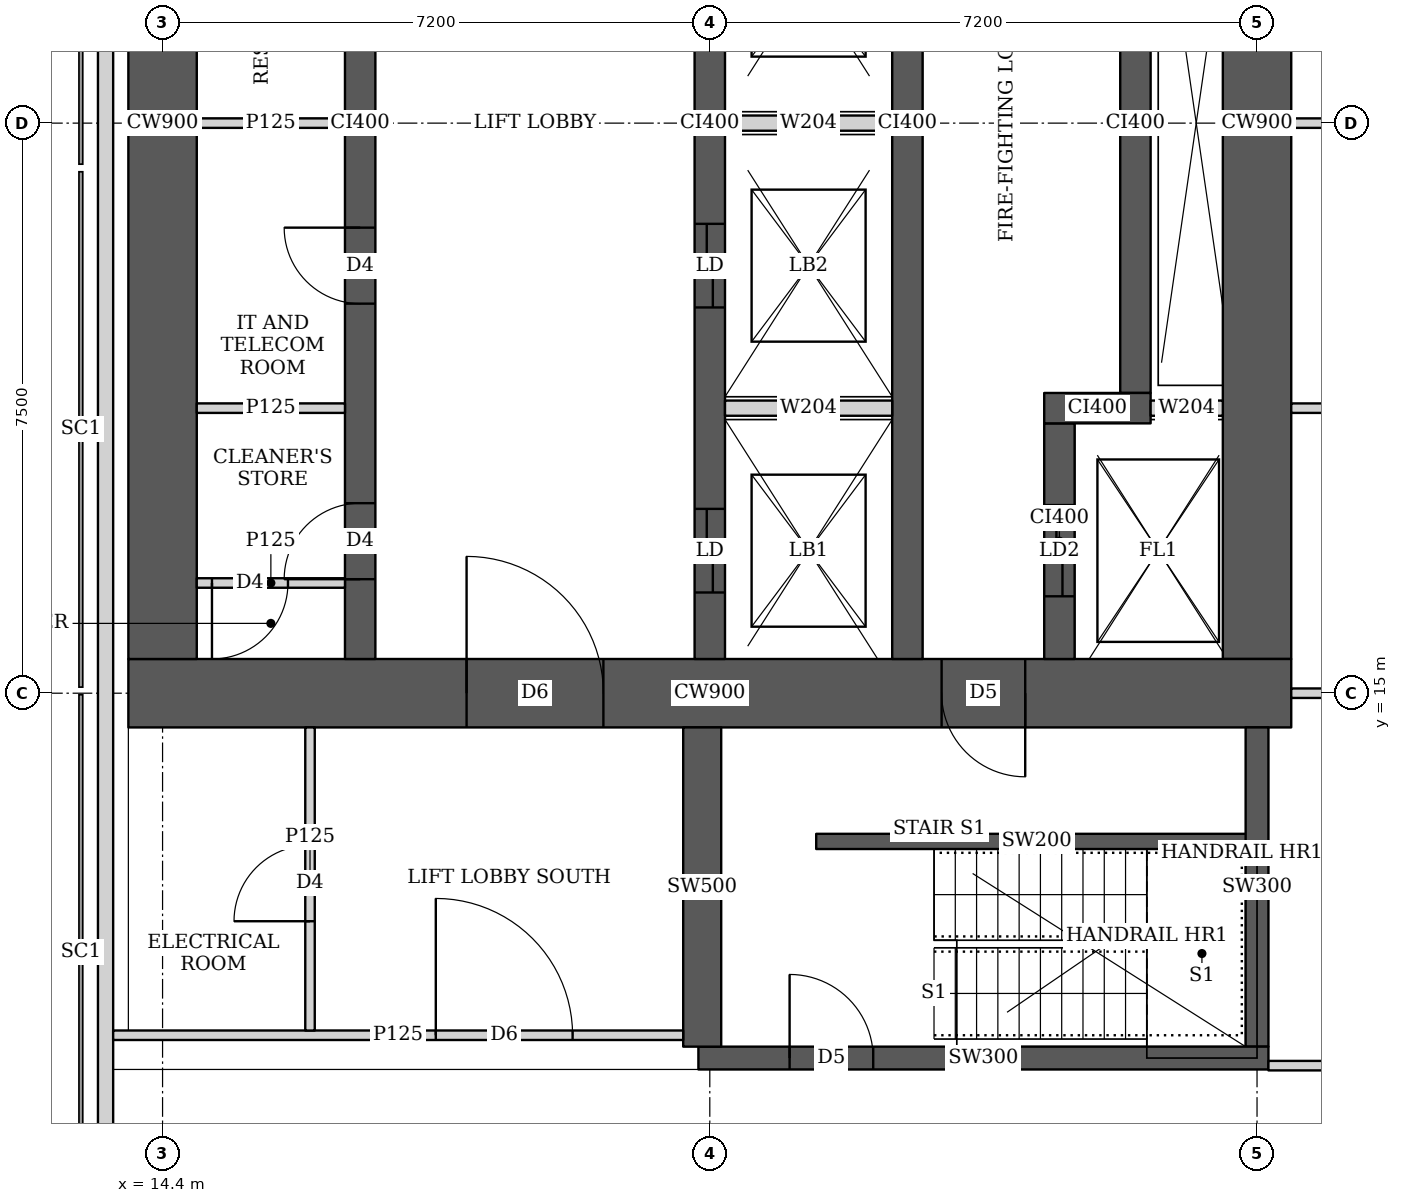
"""IFC4 building model, lengths in metres.
Left out: names, types, materials, properties, quantities, classifications, styles, units other than length and angle.
Written with IfcOpenShell. Run it as: python <this file> out.ifc"""

import sys

from ifc_helpers import new_model, si_unit, direction, frame, frame_2d, origin, place, context, subcontext, project, spatial, rectangle, extrude, element, fill, save


model = new_model("IFC4")
c1 = context("Model", 3, precision=1e-05, world=origin(), true_north=direction((0.0, 1.0)))
c2 = subcontext(c1, "Body", "Model", "MODEL_VIEW")
j1 = project(units=[si_unit("LENGTHUNIT", "METRE"), si_unit("PLANEANGLEUNIT", "RADIAN")], contexts=[c1])
p1 = place(None, origin())
s1 = spatial("IfcSite", under=j1, at=p1, CompositionType="ELEMENT")
p2 = place(p1, origin())
s2 = spatial("IfcBuilding", under=s1, at=p2, CompositionType="ELEMENT")
p3 = place(p2, frame((0.0, 0.0, 255.35)))
s3 = spatial("IfcBuildingStorey", under=s2, at=p3, CompositionType="ELEMENT", Elevation=255.35)
p4 = place(p3, frame((13.95, 15.0, 0.0), z_axis=(0.0, 0.0, 1.0), x_axis=(1.0, 0.0, 0.0)))
e1 = element("IfcWall", 1, at=p4, inside=s3, PredefinedType="SHEAR", context=c2, shape_type="SweptSolid", body=[
    extrude(rectangle(XDim=15.3, YDim=0.9, at=frame_2d((7.65, 0.0))), origin(), (0.0, 0.0, 1.0), 3.75),
])
p5 = place(p4, frame((4.45, 0.0, 0.0)))
e2 = element("IfcOpeningElement", 2, at=p5, cuts=e1, PredefinedType="OPENING", context=c2, shape_type="SweptSolid", body=[
    extrude(rectangle(XDim=1.8, YDim=2.1, at=frame_2d((0.9, 1.05))), frame((0.0, 0.46, 0.0), z_axis=(0.0, -1.0, 0.0), x_axis=(1.0, 0.0, 0.0)), (0.0, 0.0, 1.0), 0.92),
])
p6 = place(p4, frame((10.7, 0.0, 0.0)))
e3 = element("IfcOpeningElement", 3, at=p6, cuts=e1, PredefinedType="OPENING", context=c2, shape_type="SweptSolid", body=[
    extrude(rectangle(XDim=1.1, YDim=2.1, at=frame_2d((0.55, 1.05))), frame((0.0, 0.46, 0.0), z_axis=(0.0, -1.0, 0.0), x_axis=(1.0, 0.0, 0.0)), (0.0, 0.0, 1.0), 0.92),
])
for number, where, z_axis, x_axis in (
    (4, (14.4, 15.45, 0.0), (0.0, 0.0, 1.0), (0.0, 1.0, 0.0)),
    (5, (28.8, 15.45, 0.0), (0.0, 0.0, 1.0), (0.0, 1.0, 0.0)),
):
    element("IfcWall", number, at=place(p3, frame(where, z_axis=z_axis, x_axis=x_axis)), inside=s3, PredefinedType="SHEAR", context=c2, shape_type="SweptSolid", body=[
        extrude(rectangle(XDim=14.1, YDim=0.9, at=frame_2d((7.05, 0.0))), origin(), (0.0, 0.0, 1.0), 3.75),
    ])
p7 = place(p3, frame((17.0, 15.45, 0.0), z_axis=(0.0, 0.0, 1.0), x_axis=(0.0, 1.0, 0.0)))
e6 = element("IfcWall", 6, at=p7, inside=s3, PredefinedType="SHEAR", context=c2, shape_type="SweptSolid", body=[
    extrude(rectangle(XDim=14.1, YDim=0.4, at=frame_2d((7.05, 0.0))), origin(), (0.0, 0.0, 1.0), 3.75),
])
p8 = place(p7, frame((1.05, 0.0, 0.0)))
e7 = element("IfcOpeningElement", 7, at=p8, cuts=e6, PredefinedType="OPENING", context=c2, shape_type="SweptSolid", body=[
    extrude(rectangle(XDim=1.0, YDim=2.1, at=frame_2d((0.5, 1.05))), frame((0.0, 0.21, 0.0), z_axis=(0.0, -1.0, 0.0), x_axis=(1.0, 0.0, 0.0)), (0.0, 0.0, 1.0), 0.42),
])
p9 = place(p7, frame((4.675, 0.0, 0.0)))
e8 = element("IfcOpeningElement", 8, at=p9, cuts=e6, PredefinedType="OPENING", context=c2, shape_type="SweptSolid", body=[
    extrude(rectangle(XDim=1.0, YDim=2.1, at=frame_2d((0.5, 1.05))), frame((0.0, 0.21, 0.0), z_axis=(0.0, -1.0, 0.0), x_axis=(1.0, 0.0, 0.0)), (0.0, 0.0, 1.0), 0.42),
])
p10 = place(p7, frame((8.425, 0.0, 0.0)))
e9 = element("IfcOpeningElement", 9, at=p10, cuts=e6, PredefinedType="OPENING", context=c2, shape_type="SweptSolid", body=[
    extrude(rectangle(XDim=1.0, YDim=2.1, at=frame_2d((0.5, 1.05))), frame((0.0, 0.21, 0.0), z_axis=(0.0, -1.0, 0.0), x_axis=(1.0, 0.0, 0.0)), (0.0, 0.0, 1.0), 0.42),
])
p11 = place(p7, frame((12.175, 0.0, 0.0)))
e10 = element("IfcOpeningElement", 10, at=p11, cuts=e6, PredefinedType="OPENING", context=c2, shape_type="SweptSolid", body=[
    extrude(rectangle(XDim=1.0, YDim=2.1, at=frame_2d((0.5, 1.05))), frame((0.0, 0.21, 0.0), z_axis=(0.0, -1.0, 0.0), x_axis=(1.0, 0.0, 0.0)), (0.0, 0.0, 1.0), 0.42),
])
p12 = place(p3, frame((21.6, 15.45, 0.0), z_axis=(0.0, 0.0, 1.0), x_axis=(0.0, 1.0, 0.0)))
e11 = element("IfcWall", 11, at=p12, inside=s3, PredefinedType="SHEAR", context=c2, shape_type="SweptSolid", body=[
    extrude(rectangle(XDim=14.1, YDim=0.4, at=frame_2d((7.05, 0.0))), origin(), (0.0, 0.0, 1.0), 3.75),
])
p13 = place(p12, frame((0.875, 0.0, 0.0)))
e12 = element("IfcOpeningElement", 12, at=p13, cuts=e11, PredefinedType="OPENING", context=c2, shape_type="SweptSolid", body=[
    extrude(rectangle(XDim=1.1, YDim=2.1, at=frame_2d((0.55, 1.05))), frame((0.0, 0.21, 0.0), z_axis=(0.0, -1.0, 0.0), x_axis=(1.0, 0.0, 0.0)), (0.0, 0.0, 1.0), 0.42),
])
p14 = place(p12, frame((4.625, 0.0, 0.0)))
e13 = element("IfcOpeningElement", 13, at=p14, cuts=e11, PredefinedType="OPENING", context=c2, shape_type="SweptSolid", body=[
    extrude(rectangle(XDim=1.1, YDim=2.1, at=frame_2d((0.55, 1.05))), frame((0.0, 0.21, 0.0), z_axis=(0.0, -1.0, 0.0), x_axis=(1.0, 0.0, 0.0)), (0.0, 0.0, 1.0), 0.42),
])
p15 = place(p12, frame((8.375, 0.0, 0.0)))
e14 = element("IfcOpeningElement", 14, at=p15, cuts=e11, PredefinedType="OPENING", context=c2, shape_type="SweptSolid", body=[
    extrude(rectangle(XDim=1.1, YDim=2.1, at=frame_2d((0.55, 1.05))), frame((0.0, 0.21, 0.0), z_axis=(0.0, -1.0, 0.0), x_axis=(1.0, 0.0, 0.0)), (0.0, 0.0, 1.0), 0.42),
])
p16 = place(p12, frame((12.125, 0.0, 0.0)))
e15 = element("IfcOpeningElement", 15, at=p16, cuts=e11, PredefinedType="OPENING", context=c2, shape_type="SweptSolid", body=[
    extrude(rectangle(XDim=1.1, YDim=2.1, at=frame_2d((0.55, 1.05))), frame((0.0, 0.21, 0.0), z_axis=(0.0, -1.0, 0.0), x_axis=(1.0, 0.0, 0.0)), (0.0, 0.0, 1.0), 0.42),
])
p17 = place(p3, frame((24.2, 15.45, 0.0), z_axis=(0.0, 0.0, 1.0), x_axis=(0.0, 1.0, 0.0)))
e16 = element("IfcWall", 16, at=p17, inside=s3, PredefinedType="SHEAR", context=c2, shape_type="SweptSolid", body=[
    extrude(rectangle(XDim=14.1, YDim=0.4, at=frame_2d((7.05, 0.0))), origin(), (0.0, 0.0, 1.0), 3.75),
])
p18 = place(p3, frame((26.2, 15.45, 0.0), z_axis=(0.0, 0.0, 1.0), x_axis=(0.0, 1.0, 0.0)))
e17 = element("IfcWall", 17, at=p18, inside=s3, PredefinedType="SHEAR", context=c2, shape_type="SweptSolid", body=[
    extrude(rectangle(XDim=3.1, YDim=0.4, at=frame_2d((1.55, 0.0))), origin(), (0.0, 0.0, 1.0), 3.75),
])
p19 = place(p18, frame((0.825, 0.0, 0.0)))
e18 = element("IfcOpeningElement", 18, at=p19, cuts=e17, PredefinedType="OPENING", context=c2, shape_type="SweptSolid", body=[
    extrude(rectangle(XDim=1.2, YDim=2.1, at=frame_2d((0.6, 1.05))), frame((0.0, 0.21, 0.0), z_axis=(0.0, -1.0, 0.0), x_axis=(1.0, 0.0, 0.0)), (0.0, 0.0, 1.0), 0.42),
])
p20 = place(p3, frame((26.0, 18.75, 0.0), z_axis=(0.0, 0.0, 1.0), x_axis=(1.0, 0.0, 0.0)))
e19 = element("IfcWall", 19, at=p20, inside=s3, PredefinedType="SHEAR", context=c2, shape_type="SweptSolid", body=[
    extrude(rectangle(XDim=1.4, YDim=0.4, at=frame_2d((0.7, 0.0))), origin(), (0.0, 0.0, 1.0), 3.75),
])
p21 = place(p3, frame((27.2, 18.95, 0.0), z_axis=(0.0, 0.0, 1.0), x_axis=(0.0, 1.0, 0.0)))
e20 = element("IfcWall", 20, at=p21, inside=s3, PredefinedType="SHEAR", context=c2, shape_type="SweptSolid", body=[
    extrude(rectangle(XDim=7.1, YDim=0.4, at=frame_2d((3.55, 0.0))), origin(), (0.0, 0.0, 1.0), 3.75),
])
p22 = place(p3, frame((21.45, 10.2, 0.0), z_axis=(0.0, 0.0, 1.0), x_axis=(1.0, 0.0, 0.0)))
e21 = element("IfcWall", 21, at=p22, inside=s3, PredefinedType="SHEAR", context=c2, shape_type="SweptSolid", body=[
    extrude(rectangle(XDim=7.5, YDim=0.3, at=frame_2d((3.75, 0.0))), origin(), (0.0, 0.0, 1.0), 3.75),
])
p23 = place(p22, frame((1.2, 0.0, 0.0)))
e22 = element("IfcOpeningElement", 22, at=p23, cuts=e21, PredefinedType="OPENING", context=c2, shape_type="SweptSolid", body=[
    extrude(rectangle(XDim=1.1, YDim=2.1, at=frame_2d((0.55, 1.05))), frame((0.0, 0.16, 0.0), z_axis=(0.0, -1.0, 0.0), x_axis=(1.0, 0.0, 0.0)), (0.0, 0.0, 1.0), 0.32),
])
p24 = place(p3, frame((21.5, 10.35, 0.0), z_axis=(0.0, 0.0, 1.0), x_axis=(0.0, 1.0, 0.0)))
e23 = element("IfcWall", 23, at=p24, inside=s3, PredefinedType="SHEAR", context=c2, shape_type="SweptSolid", body=[
    extrude(rectangle(XDim=4.2, YDim=0.5, at=frame_2d((2.1, 0.0))), origin(), (0.0, 0.0, 1.0), 3.75),
])
p25 = place(p3, frame((28.8, 10.35, 0.0), z_axis=(0.0, 0.0, 1.0), x_axis=(0.0, 1.0, 0.0)))
e24 = element("IfcWall", 24, at=p25, inside=s3, PredefinedType="SHEAR", context=c2, shape_type="SweptSolid", body=[
    extrude(rectangle(XDim=4.2, YDim=0.3, at=frame_2d((2.1, 0.0))), origin(), (0.0, 0.0, 1.0), 3.75),
])
p26 = place(p3, frame((13.65, 43.037, 0.0), z_axis=(0.0, 0.0, 1.0), x_axis=(0.0, -1.0, 0.0)))
e25 = element("IfcWall", 25, at=p26, inside=s3, PredefinedType="SOLIDWALL", context=c2, shape_type="SweptSolid", body=[
    extrude(rectangle(XDim=35.374, YDim=0.2, at=frame_2d((17.687, 0.0))), origin(), (0.0, 0.0, 1.0), 3.5),
])
p27 = place(p26, frame((1.959, 0.0, 0.9)))
e26 = element("IfcOpeningElement", 26, at=p27, cuts=e25, PredefinedType="OPENING", context=c2, shape_type="SweptSolid", body=[
    extrude(rectangle(XDim=1.8, YDim=1.5, at=frame_2d((0.9, 0.75))), frame((0.0, 0.11, 0.0), z_axis=(0.0, -1.0, 0.0), x_axis=(1.0, 0.0, 0.0)), (0.0, 0.0, 1.0), 0.22),
])
p28 = place(p3, frame((13.75, 10.5, 0.0), z_axis=(0.0, 0.0, 1.0), x_axis=(1.0, 0.0, 0.0)))
e27 = element("IfcWall", 27, at=p28, inside=s3, PredefinedType="PARTITIONING", context=c2, shape_type="SweptSolid", body=[
    extrude(rectangle(XDim=7.5, YDim=0.125, at=frame_2d((3.75, 0.0))), origin(), (0.0, 0.0, 1.0), 3.5),
])
p29 = place(p28, frame((4.245, 0.0, 0.0)))
e28 = element("IfcOpeningElement", 28, at=p29, cuts=e27, PredefinedType="OPENING", context=c2, shape_type="SweptSolid", body=[
    extrude(rectangle(XDim=1.8, YDim=2.1, at=frame_2d((0.9, 1.05))), frame((0.0, 0.073, 0.0), z_axis=(0.0, -1.0, 0.0), x_axis=(1.0, 0.0, 0.0)), (0.0, 0.0, 1.0), 0.145),
])
p30 = place(p3, frame((16.34, 10.562, 0.0), z_axis=(0.0, 0.0, 1.0), x_axis=(0.0, 1.0, 0.0)))
e29 = element("IfcWall", 29, at=p30, inside=s3, PredefinedType="PARTITIONING", context=c2, shape_type="SweptSolid", body=[
    extrude(rectangle(XDim=3.988, YDim=0.125, at=frame_2d((1.994, 0.0))), origin(), (0.0, 0.0, 1.0), 3.5),
])
p31 = place(p30, frame((1.438, 0.0, 0.0)))
e30 = element("IfcOpeningElement", 30, at=p31, cuts=e29, PredefinedType="OPENING", context=c2, shape_type="SweptSolid", body=[
    extrude(rectangle(XDim=1.0, YDim=2.1, at=frame_2d((0.5, 1.05))), frame((0.0, 0.073, 0.0), z_axis=(0.0, -1.0, 0.0), x_axis=(1.0, 0.0, 0.0)), (0.0, 0.0, 1.0), 0.145),
])
p32 = place(p3, frame((28.95, 10.1, 0.0), z_axis=(0.0, 0.0, 1.0), x_axis=(1.0, 0.0, 0.0)))
e31 = element("IfcWall", 31, at=p32, inside=s3, PredefinedType="PARTITIONING", context=c2, shape_type="SweptSolid", body=[
    extrude(rectangle(XDim=8.933, YDim=0.125, at=frame_2d((4.467, 0.0))), origin(), (0.0, 0.0, 1.0), 3.5),
])
p33 = place(p3, frame((29.25, 15.0, 0.0), z_axis=(0.0, 0.0, 1.0), x_axis=(1.0, 0.0, 0.0)))
e32 = element("IfcWall", 32, at=p33, inside=s3, PredefinedType="PARTITIONING", context=c2, shape_type="SweptSolid", body=[
    extrude(rectangle(XDim=6.049, YDim=0.125, at=frame_2d((3.024, 0.0))), origin(), (0.0, 0.0, 1.0), 3.5),
])
p34 = place(p3, frame((29.25, 18.75, 0.0), z_axis=(0.0, 0.0, 1.0), x_axis=(1.0, 0.0, 0.0)))
e33 = element("IfcWall", 33, at=p34, inside=s3, PredefinedType="PARTITIONING", context=c2, shape_type="SweptSolid", body=[
    extrude(rectangle(XDim=7.0, YDim=0.125, at=frame_2d((3.5, 0.0))), origin(), (0.0, 0.0, 1.0), 3.5),
])
p35 = place(p3, frame((29.25, 22.5, 0.0), z_axis=(0.0, 0.0, 1.0), x_axis=(1.0, 0.0, 0.0)))
e34 = element("IfcWall", 34, at=p35, inside=s3, PredefinedType="PARTITIONING", context=c2, shape_type="SweptSolid", body=[
    extrude(rectangle(XDim=3.049, YDim=0.125, at=frame_2d((1.524, 0.0))), origin(), (0.0, 0.0, 1.0), 3.5),
])
p36 = place(p3, frame((14.85, 16.45, 0.0), z_axis=(0.0, 0.0, 1.0), x_axis=(1.0, 0.0, 0.0)))
e35 = element("IfcWall", 35, at=p36, inside=s3, PredefinedType="PARTITIONING", context=c2, shape_type="SweptSolid", body=[
    extrude(rectangle(XDim=1.95, YDim=0.125, at=frame_2d((0.975, 0.0))), origin(), (0.0, 0.0, 1.0), 3.5),
])
p37 = place(p36, frame((0.2, 0.0, 0.0)))
e36 = element("IfcOpeningElement", 36, at=p37, cuts=e35, PredefinedType="OPENING", context=c2, shape_type="SweptSolid", body=[
    extrude(rectangle(XDim=1.0, YDim=2.1, at=frame_2d((0.5, 1.05))), frame((0.0, 0.073, 0.0), z_axis=(0.0, -1.0, 0.0), x_axis=(1.0, 0.0, 0.0)), (0.0, 0.0, 1.0), 0.145),
])
for number, where, z_axis, x_axis in (
    (37, (14.85, 18.75, 0.0), (0.0, 0.0, 1.0), (1.0, 0.0, 0.0)),
    (38, (14.85, 22.5, 0.0), (0.0, 0.0, 1.0), (1.0, 0.0, 0.0)),
):
    element("IfcWall", number, at=place(p3, frame(where, z_axis=z_axis, x_axis=x_axis)), inside=s3, PredefinedType="PARTITIONING", context=c2, shape_type="SweptSolid", body=[
        extrude(rectangle(XDim=1.95, YDim=0.125, at=frame_2d((0.975, 0.0))), origin(), (0.0, 0.0, 1.0), 3.5),
    ])
p38 = place(p3, frame((23.0, 13.05, 0.0), z_axis=(0.0, 0.0, 1.0), x_axis=(1.0, 0.0, 0.0)))
e39 = element("IfcWall", 39, at=p38, inside=s3, PredefinedType="SHEAR", context=c2, shape_type="SweptSolid", body=[
    extrude(rectangle(XDim=5.8, YDim=0.2, at=frame_2d((2.9, 0.0))), origin(), (0.0, 0.0, 1.0), 3.75),
])
for number, where, z_axis, x_axis in (
    (40, (21.8, 18.75, 0.0), (0.0, 0.0, 1.0), (1.0, 0.0, 0.0)),
    (41, (21.8, 22.5, 0.0), (0.0, 0.0, 1.0), (1.0, 0.0, 0.0)),
):
    element("IfcWall", number, at=place(p3, frame(where, z_axis=z_axis, x_axis=x_axis)), inside=s3, PredefinedType="SOLIDWALL", context=c2, shape_type="SweptSolid", body=[
        extrude(rectangle(XDim=2.2, YDim=0.2, at=frame_2d((1.1, 0.0))), origin(), (0.0, 0.0, 1.0), 3.5),
    ])
p39 = place(p3, frame((27.4, 18.75, 0.0), z_axis=(0.0, 0.0, 1.0), x_axis=(1.0, 0.0, 0.0)))
e42 = element("IfcWall", 42, at=p39, inside=s3, PredefinedType="SOLIDWALL", context=c2, shape_type="SweptSolid", body=[
    extrude(rectangle(XDim=0.95, YDim=0.2, at=frame_2d((0.475, 0.0))), origin(), (0.0, 0.0, 1.0), 3.5),
])
p40 = place(p31, origin())
e43 = element("IfcDoor", 43, at=p40, inside=s3, OperationType="SINGLE_SWING_LEFT", PredefinedType="DOOR", context=c2, shape_type="SweptSolid", body=[
    extrude(rectangle(XDim=1.0, YDim=2.1, at=frame_2d((0.5, 1.05))), frame((0.0, 0.025, 0.0), z_axis=(0.0, -1.0, 0.0), x_axis=(1.0, 0.0, 0.0)), (0.0, 0.0, 1.0), 0.05),
])
fill(e30, e43)
p41 = place(p29, origin())
e44 = element("IfcDoor", 44, at=p41, inside=s3, OperationType="DOUBLE_DOOR_SINGLE_SWING", PredefinedType="DOOR", context=c2, shape_type="SweptSolid", body=[
    extrude(rectangle(XDim=1.8, YDim=2.1, at=frame_2d((0.9, 1.05))), frame((0.0, 0.025, 0.0), z_axis=(0.0, -1.0, 0.0), x_axis=(1.0, 0.0, 0.0)), (0.0, 0.0, 1.0), 0.05),
])
fill(e28, e44)
p42 = place(p37, origin())
e45 = element("IfcDoor", 45, at=p42, inside=s3, OperationType="SINGLE_SWING_RIGHT", PredefinedType="DOOR", context=c2, shape_type="SweptSolid", body=[
    extrude(rectangle(XDim=1.0, YDim=2.1, at=frame_2d((0.5, 1.05))), frame((0.0, 0.025, 0.0), z_axis=(0.0, -1.0, 0.0), x_axis=(1.0, 0.0, 0.0)), (0.0, 0.0, 1.0), 0.05),
])
fill(e36, e45)
p43 = place(p8, origin())
e46 = element("IfcDoor", 46, at=p43, inside=s3, OperationType="SINGLE_SWING_LEFT", PredefinedType="DOOR", context=c2, shape_type="SweptSolid", body=[
    extrude(rectangle(XDim=1.0, YDim=2.1, at=frame_2d((0.5, 1.05))), frame((0.0, 0.025, 0.0), z_axis=(0.0, -1.0, 0.0), x_axis=(1.0, 0.0, 0.0)), (0.0, 0.0, 1.0), 0.05),
])
fill(e7, e46)
p44 = place(p9, origin())
e47 = element("IfcDoor", 47, at=p44, inside=s3, OperationType="SINGLE_SWING_RIGHT", PredefinedType="DOOR", context=c2, shape_type="SweptSolid", body=[
    extrude(rectangle(XDim=1.0, YDim=2.1, at=frame_2d((0.5, 1.05))), frame((0.0, 0.025, 0.0), z_axis=(0.0, -1.0, 0.0), x_axis=(1.0, 0.0, 0.0)), (0.0, 0.0, 1.0), 0.05),
])
fill(e8, e47)
p45 = place(p5, origin())
e48 = element("IfcDoor", 48, at=p45, inside=s3, OperationType="DOUBLE_DOOR_SINGLE_SWING", PredefinedType="DOOR", context=c2, shape_type="SweptSolid", body=[
    extrude(rectangle(XDim=1.8, YDim=2.1, at=frame_2d((0.9, 1.05))), frame((0.0, 0.025, 0.0), z_axis=(0.0, -1.0, 0.0), x_axis=(1.0, 0.0, 0.0)), (0.0, 0.0, 1.0), 0.05),
])
fill(e2, e48)
p46 = place(p6, origin())
e49 = element("IfcDoor", 49, at=p46, inside=s3, OperationType="SINGLE_SWING_LEFT", PredefinedType="DOOR", context=c2, shape_type="SweptSolid", body=[
    extrude(rectangle(XDim=1.1, YDim=2.1, at=frame_2d((0.55, 1.05))), frame((0.0, 0.025, 0.0), z_axis=(0.0, -1.0, 0.0), x_axis=(1.0, 0.0, 0.0)), (0.0, 0.0, 1.0), 0.05),
])
fill(e3, e49)
p47 = place(p19, origin())
e50 = element("IfcDoor", 50, at=p47, inside=s3, OperationType="DOUBLE_DOOR_SLIDING", PredefinedType="DOOR", context=c2, shape_type="SweptSolid", body=[
    extrude(rectangle(XDim=1.2, YDim=2.1, at=frame_2d((0.6, 1.05))), frame((0.0, 0.025, 0.0), z_axis=(0.0, -1.0, 0.0), x_axis=(1.0, 0.0, 0.0)), (0.0, 0.0, 1.0), 0.05),
])
fill(e18, e50)
p48 = place(p13, origin())
e51 = element("IfcDoor", 51, at=p48, inside=s3, OperationType="DOUBLE_DOOR_SLIDING", PredefinedType="DOOR", context=c2, shape_type="SweptSolid", body=[
    extrude(rectangle(XDim=1.1, YDim=2.1, at=frame_2d((0.55, 1.05))), frame((0.0, 0.025, 0.0), z_axis=(0.0, -1.0, 0.0), x_axis=(1.0, 0.0, 0.0)), (0.0, 0.0, 1.0), 0.05),
])
fill(e12, e51)
p49 = place(p14, origin())
e52 = element("IfcDoor", 52, at=p49, inside=s3, OperationType="DOUBLE_DOOR_SLIDING", PredefinedType="DOOR", context=c2, shape_type="SweptSolid", body=[
    extrude(rectangle(XDim=1.1, YDim=2.1, at=frame_2d((0.55, 1.05))), frame((0.0, 0.025, 0.0), z_axis=(0.0, -1.0, 0.0), x_axis=(1.0, 0.0, 0.0)), (0.0, 0.0, 1.0), 0.05),
])
fill(e13, e52)
p50 = place(p23, origin())
e53 = element("IfcDoor", 53, at=p50, inside=s3, OperationType="SINGLE_SWING_LEFT", PredefinedType="DOOR", context=c2, shape_type="SweptSolid", body=[
    extrude(rectangle(XDim=1.1, YDim=2.1, at=frame_2d((0.55, 1.05))), frame((0.0, 0.025, 0.0), z_axis=(0.0, -1.0, 0.0), x_axis=(1.0, 0.0, 0.0)), (0.0, 0.0, 1.0), 0.05),
])
fill(e22, e53)
save(model, sys.argv[1])
